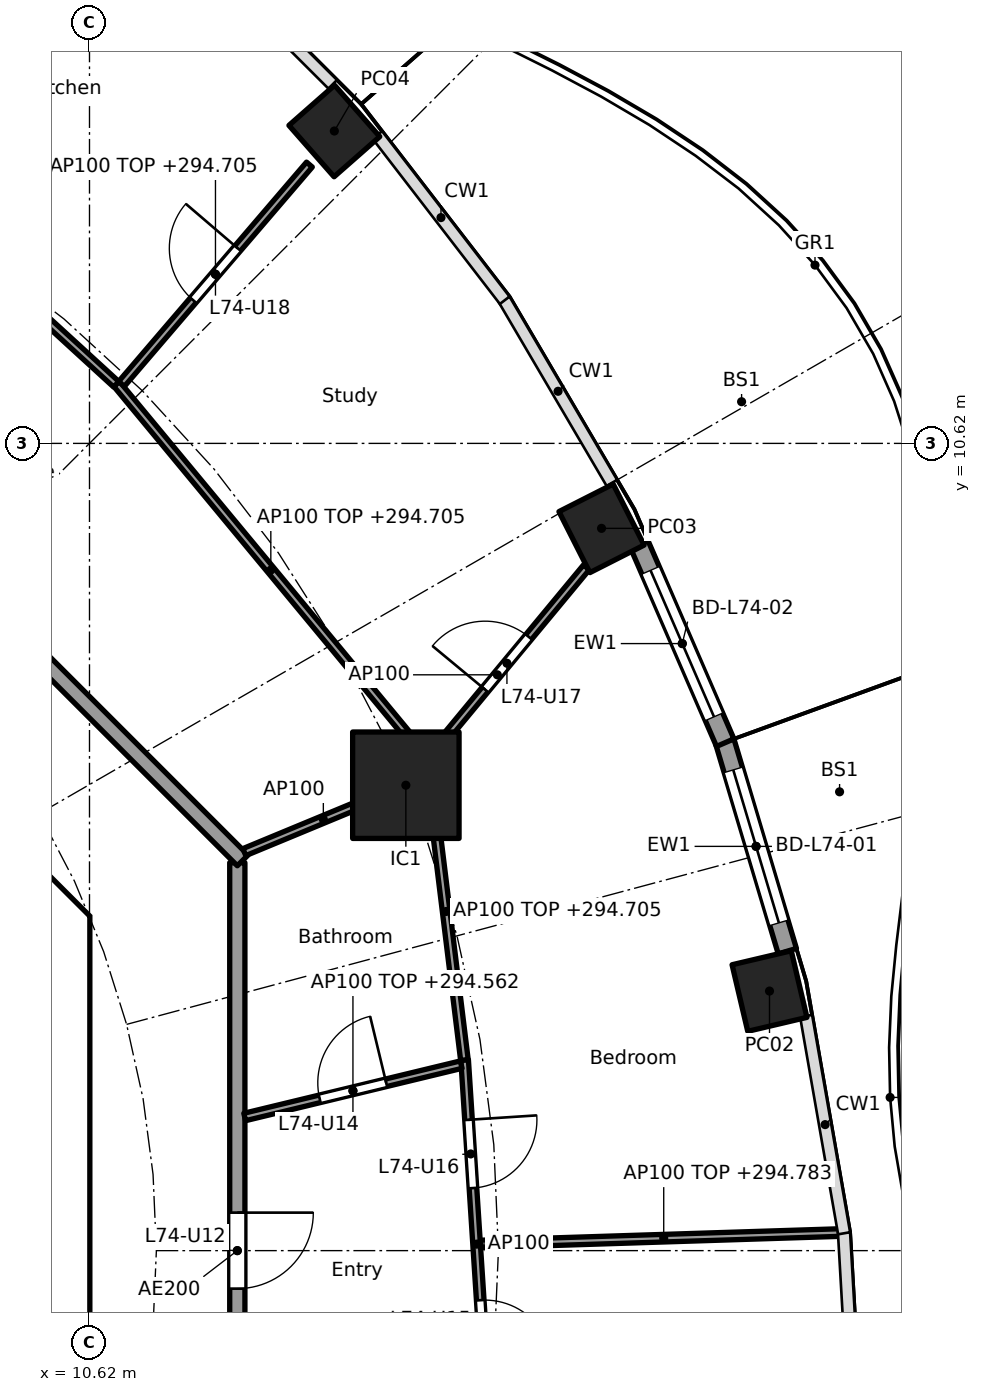
"""IFC4 building model, lengths in metres.
Left out: names, types, materials, properties, quantities, classifications, styles, units other than length and angle.
Written with IfcOpenShell. Run it as: python <this file> out.ifc"""

import sys

from ifc_helpers import new_model, si_unit, direction, frame, frame_2d, origin, origin_2d, place, context, subcontext, project, spatial, polyline, rectangle, hollow_rectangle, outline, extrude, element, fill, save


model = new_model("IFC4")
c1 = context("Model", 3, precision=1e-05, world=origin(), true_north=direction((0.0, 1.0)))
c2 = subcontext(c1, "Body", "Model", "MODEL_VIEW")
j1 = project(units=[si_unit("LENGTHUNIT", "METRE"), si_unit("PLANEANGLEUNIT", "RADIAN")], contexts=[c1])
p1 = place(None, origin())
s1 = spatial("IfcSite", under=j1, at=p1, CompositionType="ELEMENT")
p2 = place(p1, origin())
s2 = spatial("IfcBuilding", under=s1, at=p2, CompositionType="ELEMENT")
p3 = place(p2, frame((0.0, 0.0, 291.8)))
s3 = spatial("IfcBuildingStorey", under=s2, at=p3, CompositionType="ELEMENT", Elevation=291.8)
for number, where, z_axis, x_axis in (
    (1, (19.566, 3.415, 0.0), (0.0, 0.0, 1.0), (-0.229, 0.973, 0.0)),
    (2, (17.356, 9.502, 0.0), (0.0, 0.0, 1.0), (-0.452, 0.892, 0.0)),
    (3, (13.841, 14.73, 0.0), (0.0, 0.0, 1.0), (-0.66, 0.751, 0.0)),
):
    element("IfcColumn", number, at=place(p3, frame(where, z_axis=z_axis, x_axis=x_axis)), inside=s3, PredefinedType="COLUMN", context=c2, shape_type="SweptSolid", body=[
        extrude(hollow_rectangle(XDim=0.9, YDim=0.8, WallThickness=0.028, at=origin_2d()), origin(), (0.0, 0.0, 1.0), 3.7),
    ])
p4 = place(p3, frame((14.782, 6.123, 0.0), z_axis=(0.0, 0.0, 1.0), x_axis=(1.0, 0.0, 0.0)))
e4 = element("IfcColumn", 4, at=p4, inside=s3, PredefinedType="COLUMN", context=c2, shape_type="SweptSolid", body=[
    extrude(rectangle(XDim=1.4, YDim=1.4, at=origin_2d()), origin(), (0.0, 0.0, 1.0), 3.7),
])
p5 = place(p3, frame((18.978, 6.697, 0.0), z_axis=(0.0, 0.0, 1.0), x_axis=(0.285876209024, -0.9582665564, 0.0)))
e5 = element("IfcWall", 5, at=p5, inside=s3, PredefinedType="SOLIDWALL", context=c2, shape_type="SweptSolid", body=[
    extrude(rectangle(XDim=2.877, YDim=0.25, at=frame_2d((1.438, 0.0))), origin(), (0.0, 0.0, 1.0), 3.44),
])
p6 = place(p5, frame((0.389, 0.0, 0.0)))
e6 = element("IfcOpeningElement", 6, at=p6, cuts=e5, PredefinedType="OPENING", context=c2, shape_type="SweptSolid", body=[
    extrude(rectangle(XDim=2.1, YDim=2.4, at=frame_2d((1.05, 1.2))), frame((0.0, 0.135, 0.0), z_axis=(0.0, -1.0, 0.0), x_axis=(1.0, 0.0, 0.0)), (0.0, 0.0, 1.0), 0.27),
])
p7 = place(p3, frame((17.854, 9.29, 0.0), z_axis=(0.0, 0.0, 1.0), x_axis=(0.397597791596, -0.9175598052, 0.0)))
e7 = element("IfcWall", 7, at=p7, inside=s3, PredefinedType="SOLIDWALL", context=c2, shape_type="SweptSolid", body=[
    extrude(rectangle(XDim=2.841, YDim=0.25, at=frame_2d((1.42, 0.0))), origin(), (0.0, 0.0, 1.0), 3.44),
])
p8 = place(p7, frame((0.371, 0.0, 0.0)))
e8 = element("IfcOpeningElement", 8, at=p8, cuts=e7, PredefinedType="OPENING", context=c2, shape_type="SweptSolid", body=[
    extrude(rectangle(XDim=2.1, YDim=2.4, at=frame_2d((1.05, 1.2))), frame((0.0, 0.135, 0.0), z_axis=(0.0, -1.0, 0.0), x_axis=(1.0, 0.0, 0.0)), (0.0, 0.0, 1.0), 0.27),
])
p9 = place(p3, frame((9.988, 4.613, 0.0), z_axis=(0.0, 0.0, 1.0), x_axis=(-0.707106781187, 0.707106781187, 0.0)))
e9 = element("IfcWall", 9, at=p9, inside=s3, PredefinedType="SHEAR", context=c2, shape_type="SweptSolid", body=[
    extrude(rectangle(XDim=7.602, YDim=0.6, at=frame_2d((3.801, 0.0))), origin(), (0.0, 0.0, 1.0), 3.44),
])
p10 = place(p9, frame((3.201, 0.0, 0.0)))
e10 = element("IfcOpeningElement", 10, at=p10, cuts=e9, PredefinedType="OPENING", context=c2, shape_type="SweptSolid", body=[
    extrude(rectangle(XDim=1.2, YDim=2.1, at=frame_2d((0.6, 1.05))), frame((0.0, 0.31, 0.0), z_axis=(0.0, -1.0, 0.0), x_axis=(1.0, 0.0, 0.0)), (0.0, 0.0, 1.0), 0.62),
])
p11 = place(p3, origin())
e11 = element("IfcWall", 11, at=p11, inside=s3, PredefinedType="SHEAR", context=c2, shape_type="SweptSolid", body=[
    extrude(outline(polyline([(9.776, -4.401), (10.025, -4.152), (10.025, -3.801), (10.025, 4.152), (9.776, 4.401), (10.2, 4.825), (10.625, 4.401), (10.625, -4.401), (10.2, -4.825), (9.776, -4.401)])), origin(), (0.0, 0.0, 1.0), 3.44),
])
p12 = place(p3, frame((12.565, -5.104, 0.0), z_axis=(0.0, 0.0, 1.0), x_axis=(0.0, 1.0, 0.0)))
e12 = element("IfcWall", 12, at=p12, inside=s3, PredefinedType="PARTITIONING", context=c2, shape_type="SweptSolid", body=[
    extrude(rectangle(XDim=10.209, YDim=0.2, at=frame_2d((5.104, 0.0))), origin(), (0.0, 0.0, 1.0), 3.44),
])
p13 = place(p12, frame((4.604, 0.0, 0.0)))
e13 = element("IfcOpeningElement", 13, at=p13, cuts=e12, PredefinedType="OPENING", context=c2, shape_type="SweptSolid", body=[
    extrude(rectangle(XDim=1.0, YDim=2.1, at=frame_2d((0.5, 1.05))), frame((0.0, 0.11, 0.0), z_axis=(0.0, -1.0, 0.0), x_axis=(1.0, 0.0, 0.0)), (0.0, 0.0, 1.0), 0.22),
])
p14 = place(p3, frame((12.635, 5.134, 0.0), z_axis=(0.0, 0.0, 1.0), x_axis=(-0.707106781187, 0.707106781187, 0.0)))
e14 = element("IfcWall", 14, at=p14, inside=s3, PredefinedType="PARTITIONING", context=c2, shape_type="SweptSolid", body=[
    extrude(rectangle(XDim=10.609, YDim=0.2, at=frame_2d((5.305, 0.0))), origin(), (0.0, 0.0, 1.0), 3.44),
])
p15 = place(p3, frame((15.87, -2.338, 0.0), z_axis=(0.0, 0.0, 1.0), x_axis=(-0.064797294757, 0.997898447034, 0.0)))
e15 = element("IfcWall", 15, at=p15, inside=s3, PredefinedType="PARTITIONING", context=c2, shape_type="SweptSolid", body=[
    extrude(rectangle(XDim=4.857, YDim=0.1, at=frame_2d((2.428, 0.0))), origin(), (0.0, 0.0, 1.0), 3.44),
])
p16 = place(p15, frame((0.789, 0.0, 0.0)))
e16 = element("IfcOpeningElement", 16, at=p16, cuts=e15, PredefinedType="OPENING", context=c2, shape_type="SweptSolid", body=[
    extrude(rectangle(XDim=0.9, YDim=2.1, at=frame_2d((0.45, 1.05))), frame((0.0, 0.06, 0.0), z_axis=(0.0, -1.0, 0.0), x_axis=(1.0, 0.0, 0.0)), (0.0, 0.0, 1.0), 0.12),
])
p17 = place(p15, frame((3.167, 0.0, 0.0)))
e17 = element("IfcOpeningElement", 17, at=p17, cuts=e15, PredefinedType="OPENING", context=c2, shape_type="SweptSolid", body=[
    extrude(rectangle(XDim=0.9, YDim=2.1, at=frame_2d((0.45, 1.05))), frame((0.0, 0.06, 0.0), z_axis=(0.0, -1.0, 0.0), x_axis=(1.0, 0.0, 0.0)), (0.0, 0.0, 1.0), 0.12),
])
p18 = place(p3, frame((15.763, 0.087, 0.0), z_axis=(0.0, 0.0, 1.0), x_axis=(0.999492034598, 0.03186962151, 0.0)))
e18 = element("IfcWall", 18, at=p18, inside=s3, PredefinedType="PARTITIONING", context=c2, shape_type="SweptSolid", body=[
    extrude(rectangle(XDim=4.826, YDim=0.1, at=frame_2d((2.413, 0.0))), origin(), (0.0, 0.0, 1.0), 2.983),
])
p19 = place(p3, frame((12.662, 1.758, 0.0), z_axis=(0.0, 0.0, 1.0), x_axis=(0.972004827836, 0.234960879007, 0.0)))
e19 = element("IfcWall", 19, at=p19, inside=s3, PredefinedType="PARTITIONING", context=c2, shape_type="SweptSolid", body=[
    extrude(rectangle(XDim=2.93, YDim=0.1, at=frame_2d((1.465, 0.0))), origin(), (0.0, 0.0, 1.0), 2.762),
])
p20 = place(p19, frame((1.015, 0.0, 0.0)))
e20 = element("IfcOpeningElement", 20, at=p20, cuts=e19, PredefinedType="OPENING", context=c2, shape_type="SweptSolid", body=[
    extrude(rectangle(XDim=0.9, YDim=2.1, at=frame_2d((0.45, 1.05))), frame((0.0, 0.06, 0.0), z_axis=(0.0, -1.0, 0.0), x_axis=(1.0, 0.0, 0.0)), (0.0, 0.0, 1.0), 0.12),
])
p21 = place(p3, frame((15.552, 2.508, 0.0), z_axis=(0.0, 0.0, 1.0), x_axis=(-0.12196631785, 0.992534239868, 0.0)))
e21 = element("IfcWall", 21, at=p21, inside=s3, PredefinedType="PARTITIONING", context=c2, shape_type="SweptSolid", body=[
    extrude(rectangle(XDim=3.937, YDim=0.1, at=frame_2d((1.969, 0.0))), origin(), (0.0, 0.0, 1.0), 2.905),
])
p22 = place(p3, frame((12.657, 5.243, 0.0), z_axis=(0.0, 0.0, 1.0), x_axis=(0.923864733477, 0.382719158442, 0.0)))
e22 = element("IfcWall", 22, at=p22, inside=s3, PredefinedType="PARTITIONING", context=c2, shape_type="SweptSolid", body=[
    extrude(rectangle(XDim=2.25, YDim=0.1, at=frame_2d((1.125, 0.0))), origin(), (0.0, 0.0, 1.0), 3.44),
])
p23 = place(p3, frame((14.814, 6.161, 0.0), z_axis=(0.0, 0.0, 1.0), x_axis=(0.638050520313, 0.769994502272, 0.0)))
e23 = element("IfcWall", 23, at=p23, inside=s3, PredefinedType="PARTITIONING", context=c2, shape_type="SweptSolid", body=[
    extrude(rectangle(XDim=3.673, YDim=0.1, at=frame_2d((1.836, 0.0))), origin(), (0.0, 0.0, 1.0), 3.44),
])
p24 = place(p23, frame((1.584, 0.0, 0.0)))
e24 = element("IfcOpeningElement", 24, at=p24, cuts=e23, PredefinedType="OPENING", context=c2, shape_type="SweptSolid", body=[
    extrude(rectangle(XDim=0.9, YDim=2.1, at=frame_2d((0.45, 1.05))), frame((0.0, 0.06, 0.0), z_axis=(0.0, -1.0, 0.0), x_axis=(1.0, 0.0, 0.0)), (0.0, 0.0, 1.0), 0.12),
])
p25 = place(p3, frame((15.034, 6.504, 0.0), z_axis=(0.0, 0.0, 1.0), x_axis=(-0.637935278767, 0.770089981823, 0.0)))
e25 = element("IfcWall", 25, at=p25, inside=s3, PredefinedType="PARTITIONING", context=c2, shape_type="SweptSolid", body=[
    extrude(rectangle(XDim=6.361, YDim=0.1, at=frame_2d((3.18, 0.0))), origin(), (0.0, 0.0, 1.0), 2.905),
])
p26 = place(p3, frame((11.041, 11.402, 0.0), z_axis=(0.0, 0.0, 1.0), x_axis=(0.650558544325, 0.759456108282, 0.0)))
e26 = element("IfcWall", 26, at=p26, inside=s3, PredefinedType="PARTITIONING", context=c2, shape_type="SweptSolid", body=[
    extrude(rectangle(XDim=3.8, YDim=0.1, at=frame_2d((1.9, 0.0))), origin(), (0.0, 0.0, 1.0), 2.905),
])
p27 = place(p26, frame((1.45, 0.0, 0.0)))
e27 = element("IfcOpeningElement", 27, at=p27, cuts=e26, PredefinedType="OPENING", context=c2, shape_type="SweptSolid", body=[
    extrude(rectangle(XDim=0.9, YDim=2.1, at=frame_2d((0.45, 1.05))), frame((0.0, 0.06, 0.0), z_axis=(0.0, -1.0, 0.0), x_axis=(1.0, 0.0, 0.0)), (0.0, 0.0, 1.0), 0.12),
])
p28 = place(p3, frame((10.972, 11.398, 0.0), z_axis=(0.0, 0.0, 1.0), x_axis=(-0.737830272434, 0.674986288069, 0.0)))
e28 = element("IfcWall", 28, at=p28, inside=s3, PredefinedType="PARTITIONING", context=c2, shape_type="SweptSolid", body=[
    extrude(rectangle(XDim=5.827, YDim=0.1, at=frame_2d((2.914, 0.0))), origin(), (0.0, 0.0, 1.0), 2.905),
])
p29 = place(p28, frame((2.464, 0.0, 0.0)))
e29 = element("IfcOpeningElement", 29, at=p29, cuts=e28, PredefinedType="OPENING", context=c2, shape_type="SweptSolid", body=[
    extrude(rectangle(XDim=0.9, YDim=2.1, at=frame_2d((0.45, 1.05))), frame((0.0, 0.06, 0.0), z_axis=(0.0, -1.0, 0.0), x_axis=(1.0, 0.0, 0.0)), (0.0, 0.0, 1.0), 0.12),
])
p30 = place(p6, origin())
e30 = element("IfcDoor", 30, at=p30, inside=s3, OperationType="SLIDING_TO_LEFT", PredefinedType="DOOR", context=c2, shape_type="SweptSolid", body=[
    extrude(rectangle(XDim=2.1, YDim=2.4, at=frame_2d((1.05, 1.2))), frame((0.0, 0.025, 0.0), z_axis=(0.0, -1.0, 0.0), x_axis=(1.0, 0.0, 0.0)), (0.0, 0.0, 1.0), 0.05),
])
fill(e6, e30)
p31 = place(p8, origin())
e31 = element("IfcDoor", 31, at=p31, inside=s3, OperationType="SLIDING_TO_LEFT", PredefinedType="DOOR", context=c2, shape_type="SweptSolid", body=[
    extrude(rectangle(XDim=2.1, YDim=2.4, at=frame_2d((1.05, 1.2))), frame((0.0, 0.025, 0.0), z_axis=(0.0, -1.0, 0.0), x_axis=(1.0, 0.0, 0.0)), (0.0, 0.0, 1.0), 0.05),
])
fill(e8, e31)
p32 = place(p13, frame((1.0, 0.0, 0.0), x_axis=(-1.0, 0.0, 0.0)))
e32 = element("IfcDoor", 32, at=p32, inside=s3, OperationType="SINGLE_SWING_LEFT", PredefinedType="DOOR", context=c2, shape_type="SweptSolid", body=[
    extrude(rectangle(XDim=1.0, YDim=2.1, at=frame_2d((0.5, 1.05))), frame((0.0, 0.025, 0.0), z_axis=(0.0, -1.0, 0.0), x_axis=(1.0, 0.0, 0.0)), (0.0, 0.0, 1.0), 0.05),
])
fill(e13, e32)
p33 = place(p20, origin())
e33 = element("IfcDoor", 33, at=p33, inside=s3, OperationType="SINGLE_SWING_RIGHT", PredefinedType="DOOR", context=c2, shape_type="SweptSolid", body=[
    extrude(rectangle(XDim=0.9, YDim=2.1, at=frame_2d((0.45, 1.05))), frame((0.0, 0.025, 0.0), z_axis=(0.0, -1.0, 0.0), x_axis=(1.0, 0.0, 0.0)), (0.0, 0.0, 1.0), 0.05),
])
fill(e20, e33)
p34 = place(p16, frame((0.9, 0.0, 0.0), x_axis=(-1.0, 0.0, 0.0)))
e34 = element("IfcDoor", 34, at=p34, inside=s3, OperationType="SINGLE_SWING_RIGHT", PredefinedType="DOOR", context=c2, shape_type="SweptSolid", body=[
    extrude(rectangle(XDim=0.9, YDim=2.1, at=frame_2d((0.45, 1.05))), frame((0.0, 0.025, 0.0), z_axis=(0.0, -1.0, 0.0), x_axis=(1.0, 0.0, 0.0)), (0.0, 0.0, 1.0), 0.05),
])
fill(e16, e34)
p35 = place(p17, frame((0.9, 0.0, 0.0), x_axis=(-1.0, 0.0, 0.0)))
e35 = element("IfcDoor", 35, at=p35, inside=s3, OperationType="SINGLE_SWING_LEFT", PredefinedType="DOOR", context=c2, shape_type="SweptSolid", body=[
    extrude(rectangle(XDim=0.9, YDim=2.1, at=frame_2d((0.45, 1.05))), frame((0.0, 0.025, 0.0), z_axis=(0.0, -1.0, 0.0), x_axis=(1.0, 0.0, 0.0)), (0.0, 0.0, 1.0), 0.05),
])
fill(e17, e35)
p36 = place(p24, origin())
e36 = element("IfcDoor", 36, at=p36, inside=s3, OperationType="SINGLE_SWING_LEFT", PredefinedType="DOOR", context=c2, shape_type="SweptSolid", body=[
    extrude(rectangle(XDim=0.9, YDim=2.1, at=frame_2d((0.45, 1.05))), frame((0.0, 0.025, 0.0), z_axis=(0.0, -1.0, 0.0), x_axis=(1.0, 0.0, 0.0)), (0.0, 0.0, 1.0), 0.05),
])
fill(e24, e36)
p37 = place(p27, origin())
e37 = element("IfcDoor", 37, at=p37, inside=s3, OperationType="SINGLE_SWING_RIGHT", PredefinedType="DOOR", context=c2, shape_type="SweptSolid", body=[
    extrude(rectangle(XDim=0.9, YDim=2.1, at=frame_2d((0.45, 1.05))), frame((0.0, 0.025, 0.0), z_axis=(0.0, -1.0, 0.0), x_axis=(1.0, 0.0, 0.0)), (0.0, 0.0, 1.0), 0.05),
])
fill(e27, e37)
save(model, sys.argv[1])
